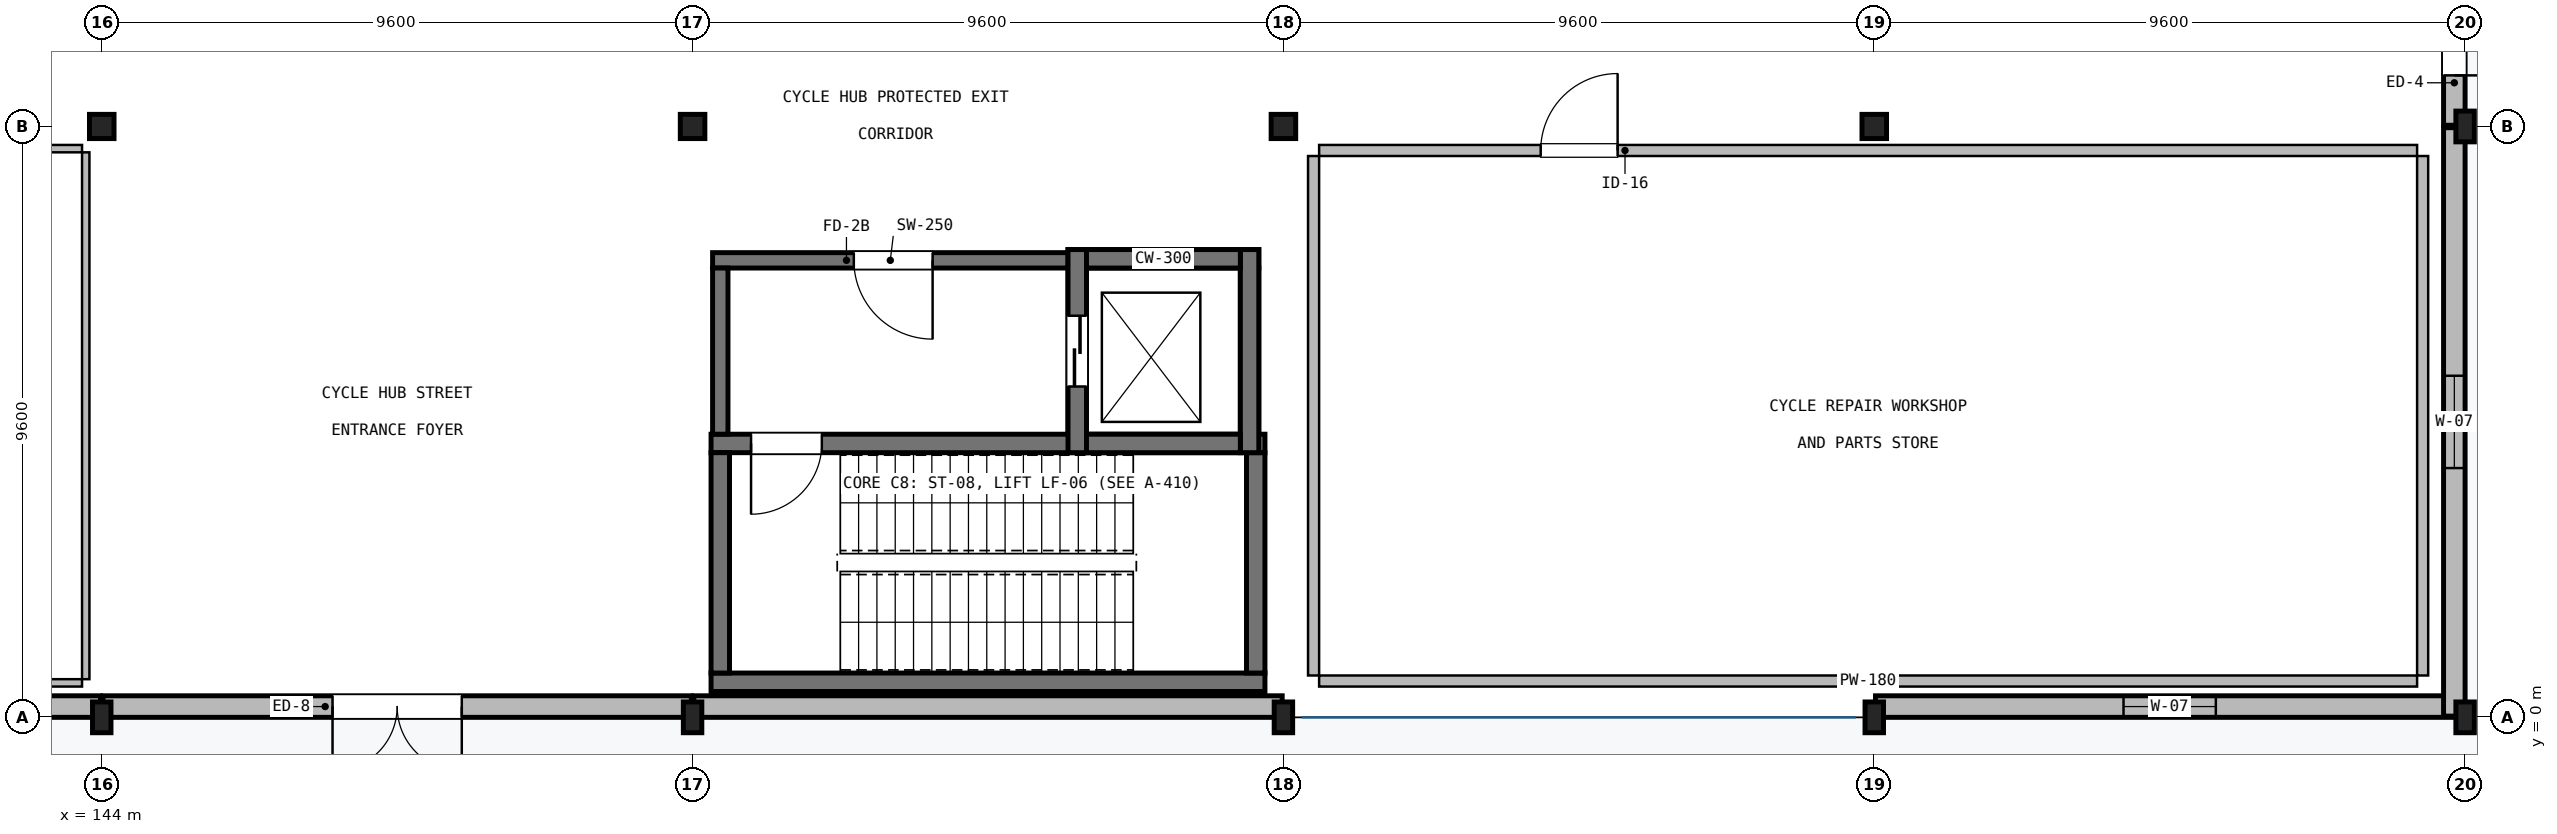
"""IFC4 building model, lengths in metres.
Left out: names, types, materials, properties, quantities, classifications, styles, units other than length and angle.
Written with IfcOpenShell. Run it as: python <this file> out.ifc"""

import sys

from ifc_helpers import new_model, si_unit, direction, frame, frame_2d, origin, origin_2d, place, context, subcontext, project, spatial, rectangle, i_section, extrude, element, fill, save


model = new_model("IFC4")
c1 = context("Model", 3, precision=1e-05, world=origin(), true_north=direction((0.0, 1.0)))
c2 = subcontext(c1, "Body", "Model", "MODEL_VIEW")
j1 = project(units=[si_unit("LENGTHUNIT", "METRE"), si_unit("PLANEANGLEUNIT", "RADIAN")], contexts=[c1])
p1 = place(None, origin())
s1 = spatial("IfcSite", under=j1, at=p1, CompositionType="ELEMENT")
p2 = place(p1, origin())
s2 = spatial("IfcBuilding", under=s1, at=p2, CompositionType="ELEMENT")
p3 = place(p2, origin())
s3 = spatial("IfcBuildingStorey", under=s2, at=p3, CompositionType="ELEMENT", Elevation=0.0)
p4 = place(p3, frame((144.0, 0.0, -0.36), z_axis=(0.0, 0.0, 1.0), x_axis=(1.0, 0.0, 0.0)))
e1 = element("IfcColumn", 1, at=p4, inside=s3, PredefinedType="COLUMN", context=c2, shape_type="SweptSolid", body=[
    extrude(i_section(OverallWidth=0.3, OverallDepth=0.5, WebThickness=0.014, FlangeThickness=0.028, FilletRadius=0.027, at=origin_2d()), origin(), (0.0, 0.0, 1.0), 6.11),
])
p5 = place(p3, frame((144.0, 9.6, -0.36), z_axis=(0.0, 0.0, 1.0), x_axis=(1.0, 0.0, 0.0)))
e2 = element("IfcColumn", 2, at=p5, inside=s3, PredefinedType="COLUMN", context=c2, shape_type="SweptSolid", body=[
    extrude(i_section(OverallWidth=0.399, OverallDepth=0.394, WebThickness=0.023, FlangeThickness=0.037, FilletRadius=0.015, at=origin_2d()), origin(), (0.0, 0.0, 1.0), 6.11),
])
p6 = place(p3, frame((153.6, 0.0, -0.36), z_axis=(0.0, 0.0, 1.0), x_axis=(1.0, 0.0, 0.0)))
e3 = element("IfcColumn", 3, at=p6, inside=s3, PredefinedType="COLUMN", context=c2, shape_type="SweptSolid", body=[
    extrude(i_section(OverallWidth=0.3, OverallDepth=0.5, WebThickness=0.014, FlangeThickness=0.028, FilletRadius=0.027, at=origin_2d()), origin(), (0.0, 0.0, 1.0), 6.11),
])
p7 = place(p3, frame((153.6, 9.6, -0.36), z_axis=(0.0, 0.0, 1.0), x_axis=(1.0, 0.0, 0.0)))
e4 = element("IfcColumn", 4, at=p7, inside=s3, PredefinedType="COLUMN", context=c2, shape_type="SweptSolid", body=[
    extrude(i_section(OverallWidth=0.399, OverallDepth=0.394, WebThickness=0.023, FlangeThickness=0.037, FilletRadius=0.015, at=origin_2d()), origin(), (0.0, 0.0, 1.0), 6.11),
])
p8 = place(p3, frame((163.2, 0.0, -0.36), z_axis=(0.0, 0.0, 1.0), x_axis=(1.0, 0.0, 0.0)))
e5 = element("IfcColumn", 5, at=p8, inside=s3, PredefinedType="COLUMN", context=c2, shape_type="SweptSolid", body=[
    extrude(i_section(OverallWidth=0.3, OverallDepth=0.5, WebThickness=0.014, FlangeThickness=0.028, FilletRadius=0.027, at=origin_2d()), origin(), (0.0, 0.0, 1.0), 6.11),
])
p9 = place(p3, frame((163.2, 9.6, -0.36), z_axis=(0.0, 0.0, 1.0), x_axis=(1.0, 0.0, 0.0)))
e6 = element("IfcColumn", 6, at=p9, inside=s3, PredefinedType="COLUMN", context=c2, shape_type="SweptSolid", body=[
    extrude(i_section(OverallWidth=0.399, OverallDepth=0.394, WebThickness=0.023, FlangeThickness=0.037, FilletRadius=0.015, at=origin_2d()), origin(), (0.0, 0.0, 1.0), 6.11),
])
p10 = place(p3, frame((172.8, 0.0, -0.36), z_axis=(0.0, 0.0, 1.0), x_axis=(1.0, 0.0, 0.0)))
e7 = element("IfcColumn", 7, at=p10, inside=s3, PredefinedType="COLUMN", context=c2, shape_type="SweptSolid", body=[
    extrude(i_section(OverallWidth=0.3, OverallDepth=0.5, WebThickness=0.014, FlangeThickness=0.028, FilletRadius=0.027, at=origin_2d()), origin(), (0.0, 0.0, 1.0), 6.11),
])
p11 = place(p3, frame((172.8, 9.6, -0.36), z_axis=(0.0, 0.0, 1.0), x_axis=(1.0, 0.0, 0.0)))
e8 = element("IfcColumn", 8, at=p11, inside=s3, PredefinedType="COLUMN", context=c2, shape_type="SweptSolid", body=[
    extrude(i_section(OverallWidth=0.399, OverallDepth=0.394, WebThickness=0.023, FlangeThickness=0.037, FilletRadius=0.015, at=origin_2d()), origin(), (0.0, 0.0, 1.0), 6.11),
])
for number, where, z_axis, x_axis in (
    (9, (182.4, 0.0, -0.36), (0.0, 0.0, 1.0), (1.0, 0.0, 0.0)),
    (10, (182.4, 9.6, -0.36), (0.0, 0.0, 1.0), (1.0, 0.0, 0.0)),
):
    element("IfcColumn", number, at=place(p3, frame(where, z_axis=z_axis, x_axis=x_axis)), inside=s3, PredefinedType="COLUMN", context=c2, shape_type="SweptSolid", body=[
        extrude(i_section(OverallWidth=0.3, OverallDepth=0.5, WebThickness=0.014, FlangeThickness=0.028, FilletRadius=0.027, at=origin_2d()), origin(), (0.0, 0.0, 1.0), 6.11),
    ])
p12 = place(p3, frame((153.9, 0.57, 0.0), z_axis=(0.0, 0.0, 1.0), x_axis=(1.0, 0.0, 0.0)))
e11 = element("IfcWall", 11, at=p12, inside=s3, PredefinedType="SHEAR", context=c2, shape_type="SweptSolid", body=[
    extrude(rectangle(XDim=9.0, YDim=0.3, at=frame_2d((4.5, 0.0))), origin(), (0.0, 0.0, 1.0), 5.75),
])
p13 = place(p3, frame((162.9, 4.45, 0.0), z_axis=(0.0, 0.0, 1.0), x_axis=(-1.0, 0.0, 0.0)))
e12 = element("IfcWall", 12, at=p13, inside=s3, PredefinedType="SHEAR", context=c2, shape_type="SweptSolid", body=[
    extrude(rectangle(XDim=9.0, YDim=0.3, at=frame_2d((4.5, 0.0))), origin(), (0.0, 0.0, 1.0), 5.75),
])
p14 = place(p13, frame((7.2, 0.0, 0.0)))
e13 = element("IfcOpeningElement", 13, at=p14, cuts=e12, PredefinedType="OPENING", context=c2, shape_type="SweptSolid", body=[
    extrude(rectangle(XDim=1.15, YDim=2.15, at=frame_2d((0.575, 1.075))), frame((0.0, 0.16, 0.0), z_axis=(0.0, -1.0, 0.0), x_axis=(1.0, 0.0, 0.0)), (0.0, 0.0, 1.0), 0.32),
])
for number, where, z_axis, x_axis in (
    (14, (154.05, 0.72, 0.0), (0.0, 0.0, 1.0), (0.0, 1.0, 0.0)),
    (15, (162.75, 4.3, 0.0), (0.0, 0.0, 1.0), (0.0, -1.0, 0.0)),
):
    element("IfcWall", number, at=place(p3, frame(where, z_axis=z_axis, x_axis=x_axis)), inside=s3, PredefinedType="SHEAR", context=c2, shape_type="SweptSolid", body=[
        extrude(rectangle(XDim=3.58, YDim=0.3, at=frame_2d((1.79, 0.0))), origin(), (0.0, 0.0, 1.0), 5.75),
    ])
p15 = place(p3, frame((159.85, 7.3, 0.0), z_axis=(0.0, 0.0, 1.0), x_axis=(0.0, -1.0, 0.0)))
e16 = element("IfcWall", 16, at=p15, inside=s3, PredefinedType="SHEAR", context=c2, shape_type="SweptSolid", body=[
    extrude(rectangle(XDim=2.7, YDim=0.3, at=frame_2d((1.35, 0.0))), origin(), (0.0, 0.0, 1.0), 5.75),
])
p16 = place(p15, frame((0.775, 0.0, 0.0)))
e17 = element("IfcOpeningElement", 17, at=p16, cuts=e16, PredefinedType="OPENING", context=c2, shape_type="SweptSolid", body=[
    extrude(rectangle(XDim=1.15, YDim=2.1, at=frame_2d((0.575, 1.05))), frame((0.0, 0.16, 0.0), z_axis=(0.0, -1.0, 0.0), x_axis=(1.0, 0.0, 0.0)), (0.0, 0.0, 1.0), 0.32),
])
p17 = place(p3, frame((162.65, 4.6, 0.0), z_axis=(0.0, 0.0, 1.0), x_axis=(0.0, 1.0, 0.0)))
e18 = element("IfcWall", 18, at=p17, inside=s3, PredefinedType="SHEAR", context=c2, shape_type="SweptSolid", body=[
    extrude(rectangle(XDim=2.7, YDim=0.3, at=frame_2d((1.35, 0.0))), origin(), (0.0, 0.0, 1.0), 5.75),
])
p18 = place(p3, frame((159.7, 7.45, 0.0), z_axis=(0.0, 0.0, 1.0), x_axis=(1.0, 0.0, 0.0)))
e19 = element("IfcWall", 19, at=p18, inside=s3, PredefinedType="SHEAR", context=c2, shape_type="SweptSolid", body=[
    extrude(rectangle(XDim=3.1, YDim=0.3, at=frame_2d((1.55, 0.0))), origin(), (0.0, 0.0, 1.0), 5.75),
])
p19 = place(p3, frame((159.7, 7.425, 0.0), z_axis=(0.0, 0.0, 1.0), x_axis=(-1.0, 0.0, 0.0)))
e20 = element("IfcWall", 20, at=p19, inside=s3, PredefinedType="SHEAR", context=c2, shape_type="SweptSolid", body=[
    extrude(rectangle(XDim=5.775, YDim=0.25, at=frame_2d((2.887, 0.0))), origin(), (0.0, 0.0, 1.0), 5.75),
])
p20 = place(p19, frame((2.2, 0.0, 0.0)))
e21 = element("IfcOpeningElement", 21, at=p20, cuts=e20, PredefinedType="OPENING", context=c2, shape_type="SweptSolid", body=[
    extrude(rectangle(XDim=1.28, YDim=2.2, at=frame_2d((0.64, 1.1))), frame((0.0, 0.135, 0.0), z_axis=(0.0, -1.0, 0.0), x_axis=(1.0, 0.0, 0.0)), (0.0, 0.0, 1.0), 0.27),
])
p21 = place(p3, frame((154.05, 4.6, 0.0), z_axis=(0.0, 0.0, 1.0), x_axis=(0.0, 1.0, 0.0)))
e22 = element("IfcWall", 22, at=p21, inside=s3, PredefinedType="SHEAR", context=c2, shape_type="SweptSolid", body=[
    extrude(rectangle(XDim=2.7, YDim=0.25, at=frame_2d((1.35, 0.0))), origin(), (0.0, 0.0, 1.0), 5.75),
])
for number, where, z_axis, x_axis in (
    (23, (159.85, 4.3, -1.2), (0.0, 0.0, 1.0), (0.0, 1.0, 0.0)),
    (24, (162.65, 4.3, -1.2), (0.0, 0.0, 1.0), (0.0, 1.0, 0.0)),
):
    element("IfcWall", number, at=place(p3, frame(where, z_axis=z_axis, x_axis=x_axis)), inside=s3, PredefinedType="SHEAR", context=c2, shape_type="SweptSolid", body=[
        extrude(rectangle(XDim=3.3, YDim=0.3, at=frame_2d((1.65, 0.0))), origin(), (0.0, 0.0, 1.0), 0.82),
    ])
for number, where, z_axis, x_axis in (
    (25, (160.0, 4.45, -1.2), (0.0, 0.0, 1.0), (1.0, 0.0, 0.0)),
    (26, (160.0, 7.45, -1.2), (0.0, 0.0, 1.0), (1.0, 0.0, 0.0)),
):
    element("IfcWall", number, at=place(p3, frame(where, z_axis=z_axis, x_axis=x_axis)), inside=s3, PredefinedType="SHEAR", context=c2, shape_type="SweptSolid", body=[
        extrude(rectangle(XDim=2.5, YDim=0.3, at=frame_2d((1.25, 0.0))), origin(), (0.0, 0.0, 1.0), 0.82),
    ])
p22 = place(p3, frame((143.98, 0.175, 0.0), z_axis=(0.0, 0.0, 1.0), x_axis=(-1.0, 0.0, 0.0)))
e27 = element("IfcWall", 27, at=p22, inside=s3, PredefinedType="SOLIDWALL", context=c2, shape_type="SweptSolid", body=[
    extrude(rectangle(XDim=9.56, YDim=0.35, at=frame_2d((4.78, 0.0))), origin(), (0.0, 0.0, 1.0), 5.4),
])
p23 = place(p22, frame((3.505, 0.0, 0.9)))
e28 = element("IfcOpeningElement", 28, at=p23, cuts=e27, PredefinedType="OPENING", context=c2, shape_type="SweptSolid", body=[
    extrude(rectangle(XDim=2.55, YDim=1.8, at=frame_2d((1.275, 0.9))), frame((0.0, 0.185, 0.0), z_axis=(0.0, -1.0, 0.0), x_axis=(1.0, 0.0, 0.0)), (0.0, 0.0, 1.0), 0.37),
])
p24 = place(p3, frame((153.58, 0.175, 0.0), z_axis=(0.0, 0.0, 1.0), x_axis=(-1.0, 0.0, 0.0)))
e29 = element("IfcWall", 29, at=p24, inside=s3, PredefinedType="SOLIDWALL", context=c2, shape_type="SweptSolid", body=[
    extrude(rectangle(XDim=9.56, YDim=0.35, at=frame_2d((4.78, 0.0))), origin(), (0.0, 0.0, 1.0), 5.4),
])
p25 = place(p24, frame((3.73, 0.0, 0.0)))
e30 = element("IfcOpeningElement", 30, at=p25, cuts=e29, PredefinedType="OPENING", context=c2, shape_type="SweptSolid", body=[
    extrude(rectangle(XDim=2.1, YDim=2.35, at=frame_2d((1.05, 1.175))), frame((0.0, 0.185, 0.0), z_axis=(0.0, -1.0, 0.0), x_axis=(1.0, 0.0, 0.0)), (0.0, 0.0, 1.0), 0.37),
])
p26 = place(p3, frame((163.18, 0.175, 0.0), z_axis=(0.0, 0.0, 1.0), x_axis=(-1.0, 0.0, 0.0)))
e31 = element("IfcWall", 31, at=p26, inside=s3, PredefinedType="SOLIDWALL", context=c2, shape_type="SweptSolid", body=[
    extrude(rectangle(XDim=9.56, YDim=0.35, at=frame_2d((4.78, 0.0))), origin(), (0.0, 0.0, 1.0), 5.4),
])
p27 = place(p3, frame((182.38, 0.175, 0.0), z_axis=(0.0, 0.0, 1.0), x_axis=(-1.0, 0.0, 0.0)))
e32 = element("IfcWall", 32, at=p27, inside=s3, PredefinedType="SOLIDWALL", context=c2, shape_type="SweptSolid", body=[
    extrude(rectangle(XDim=9.56, YDim=0.35, at=frame_2d((4.78, 0.0))), origin(), (0.0, 0.0, 1.0), 5.4),
])
p28 = place(p27, frame((4.03, 0.0, 0.9)))
e33 = element("IfcOpeningElement", 33, at=p28, cuts=e32, PredefinedType="OPENING", context=c2, shape_type="SweptSolid", body=[
    extrude(rectangle(XDim=1.5, YDim=1.5, at=frame_2d((0.75, 0.75))), frame((0.0, 0.185, 0.0), z_axis=(0.0, -1.0, 0.0), x_axis=(1.0, 0.0, 0.0)), (0.0, 0.0, 1.0), 0.37),
])
p29 = place(p3, frame((182.225, 9.58, 0.0), z_axis=(0.0, 0.0, 1.0), x_axis=(0.0, -1.0, 0.0)))
e34 = element("IfcWall", 34, at=p29, inside=s3, PredefinedType="SOLIDWALL", context=c2, shape_type="SweptSolid", body=[
    extrude(rectangle(XDim=9.56, YDim=0.35, at=frame_2d((4.78, 0.0))), origin(), (0.0, 0.0, 1.0), 5.217),
])
p30 = place(p29, frame((4.03, 0.0, 0.9)))
e35 = element("IfcOpeningElement", 35, at=p30, cuts=e34, PredefinedType="OPENING", context=c2, shape_type="SweptSolid", body=[
    extrude(rectangle(XDim=1.5, YDim=1.5, at=frame_2d((0.75, 0.75))), frame((0.0, 0.185, 0.0), z_axis=(0.0, -1.0, 0.0), x_axis=(1.0, 0.0, 0.0)), (0.0, 0.0, 1.0), 0.37),
])
p31 = place(p3, frame((182.225, 19.18, 0.0), z_axis=(0.0, 0.0, 1.0), x_axis=(0.0, -1.0, 0.0)))
e36 = element("IfcWall", 36, at=p31, inside=s3, PredefinedType="SOLIDWALL", context=c2, shape_type="SweptSolid", body=[
    extrude(rectangle(XDim=9.56, YDim=0.35, at=frame_2d((4.78, 0.0))), origin(), (0.0, 0.0, 1.0), 5.217),
])
p32 = place(p31, frame((7.15, 0.0, 0.0)))
e37 = element("IfcOpeningElement", 37, at=p32, cuts=e36, PredefinedType="OPENING", context=c2, shape_type="SweptSolid", body=[
    extrude(rectangle(XDim=1.6, YDim=2.2, at=frame_2d((0.8, 1.1))), frame((0.0, 0.185, 0.0), z_axis=(0.0, -1.0, 0.0), x_axis=(1.0, 0.0, 0.0)), (0.0, 0.0, 1.0), 0.37),
])
p33 = place(p3, frame((181.62, 0.59, 0.0), z_axis=(0.0, 0.0, 1.0), x_axis=(-1.0, 0.0, 0.0)))
e38 = element("IfcWall", 38, at=p33, inside=s3, PredefinedType="PARTITIONING", context=c2, shape_type="SweptSolid", body=[
    extrude(rectangle(XDim=17.84, YDim=0.18, at=frame_2d((8.92, 0.0))), origin(), (0.0, 0.0, 1.0), 5.207),
])
p34 = place(p3, frame((163.78, 9.21, 0.0), z_axis=(0.0, 0.0, 1.0), x_axis=(1.0, 0.0, 0.0)))
e39 = element("IfcWall", 39, at=p34, inside=s3, PredefinedType="PARTITIONING", context=c2, shape_type="SweptSolid", body=[
    extrude(rectangle(XDim=17.84, YDim=0.18, at=frame_2d((8.92, 0.0))), origin(), (0.0, 0.0, 1.0), 5.207),
])
p35 = place(p34, frame((3.6, 0.0, 0.0)))
e40 = element("IfcOpeningElement", 40, at=p35, cuts=e39, PredefinedType="OPENING", context=c2, shape_type="SweptSolid", body=[
    extrude(rectangle(XDim=1.25, YDim=2.25, at=frame_2d((0.625, 1.125))), frame((0.0, 0.1, 0.0), z_axis=(0.0, -1.0, 0.0), x_axis=(1.0, 0.0, 0.0)), (0.0, 0.0, 1.0), 0.2),
])
for number, where, z_axis, x_axis in (
    (41, (163.69, 0.68, 0.0), (0.0, 0.0, 1.0), (0.0, 1.0, 0.0)),
    (42, (181.71, 9.12, 0.0), (0.0, 0.0, 1.0), (0.0, -1.0, 0.0)),
):
    element("IfcWall", number, at=place(p3, frame(where, z_axis=z_axis, x_axis=x_axis)), inside=s3, PredefinedType="PARTITIONING", context=c2, shape_type="SweptSolid", body=[
        extrude(rectangle(XDim=8.44, YDim=0.18, at=frame_2d((4.22, 0.0))), origin(), (0.0, 0.0, 1.0), 5.39),
    ])
p36 = place(p3, frame((143.68, 0.56, 0.0), z_axis=(0.0, 0.0, 1.0), x_axis=(-1.0, 0.0, 0.0)))
e43 = element("IfcWall", 43, at=p36, inside=s3, PredefinedType="PARTITIONING", context=c2, shape_type="SweptSolid", body=[
    extrude(rectangle(XDim=8.76, YDim=0.12, at=frame_2d((4.38, 0.0))), origin(), (0.0, 0.0, 1.0), 5.39),
])
p37 = place(p3, frame((134.92, 9.24, 0.0), z_axis=(0.0, 0.0, 1.0), x_axis=(1.0, 0.0, 0.0)))
e44 = element("IfcWall", 44, at=p37, inside=s3, PredefinedType="PARTITIONING", context=c2, shape_type="SweptSolid", body=[
    extrude(rectangle(XDim=8.76, YDim=0.12, at=frame_2d((4.38, 0.0))), origin(), (0.0, 0.0, 1.0), 5.39),
])
p38 = place(p37, frame((3.63, 0.0, 0.0)))
e45 = element("IfcOpeningElement", 45, at=p38, cuts=e44, PredefinedType="OPENING", context=c2, shape_type="SweptSolid", body=[
    extrude(rectangle(XDim=1.5, YDim=2.25, at=frame_2d((0.75, 1.125))), frame((0.0, 0.07, 0.0), z_axis=(0.0, -1.0, 0.0), x_axis=(1.0, 0.0, 0.0)), (0.0, 0.0, 1.0), 0.14),
])
p39 = place(p3, frame((143.74, 9.18, 0.0), z_axis=(0.0, 0.0, 1.0), x_axis=(0.0, -1.0, 0.0)))
e46 = element("IfcWall", 46, at=p39, inside=s3, PredefinedType="PARTITIONING", context=c2, shape_type="SweptSolid", body=[
    extrude(rectangle(XDim=8.56, YDim=0.12, at=frame_2d((4.28, 0.0))), origin(), (0.0, 0.0, 1.0), 5.39),
])
p40 = place(p14, origin())
e47 = element("IfcDoor", 47, at=p40, inside=s3, OperationType="SINGLE_SWING_RIGHT", PredefinedType="DOOR", context=c2, shape_type="SweptSolid", body=[
    extrude(rectangle(XDim=1.15, YDim=2.15, at=frame_2d((0.575, 1.075))), frame((0.0, 0.025, 0.0), z_axis=(0.0, -1.0, 0.0), x_axis=(1.0, 0.0, 0.0)), (0.0, 0.0, 1.0), 0.05),
])
fill(e13, e47)
p41 = place(p16, frame((1.15, 0.0, 0.0), z_axis=(0.0, 0.0, 1.0), x_axis=(-1.0, 0.0, 0.0)))
e48 = element("IfcDoor", 48, at=p41, inside=s3, OperationType="DOUBLE_DOOR_SLIDING", PredefinedType="DOOR", context=c2, shape_type="SweptSolid", body=[
    extrude(rectangle(XDim=1.15, YDim=2.1, at=frame_2d((0.575, 1.05))), frame((0.0, 0.025, 0.0), z_axis=(0.0, -1.0, 0.0), x_axis=(1.0, 0.0, 0.0)), (0.0, 0.0, 1.0), 0.05),
])
fill(e17, e48)
p42 = place(p20, origin())
e49 = element("IfcDoor", 49, at=p42, inside=s3, OperationType="SINGLE_SWING_LEFT", PredefinedType="DOOR", context=c2, shape_type="SweptSolid", body=[
    extrude(rectangle(XDim=1.28, YDim=2.2, at=frame_2d((0.64, 1.1))), frame((0.0, 0.025, 0.0), z_axis=(0.0, -1.0, 0.0), x_axis=(1.0, 0.0, 0.0)), (0.0, 0.0, 1.0), 0.05),
])
fill(e21, e49)
p43 = place(p25, origin())
e50 = element("IfcDoor", 50, at=p43, inside=s3, OperationType="DOUBLE_DOOR_SINGLE_SWING", PredefinedType="DOOR", context=c2, shape_type="SweptSolid", body=[
    extrude(rectangle(XDim=2.1, YDim=2.35, at=frame_2d((1.05, 1.175))), frame((0.0, 0.025, 0.0), z_axis=(0.0, -1.0, 0.0), x_axis=(1.0, 0.0, 0.0)), (0.0, 0.0, 1.0), 0.05),
])
fill(e30, e50)
p44 = place(p28, origin())
e51 = element("IfcWindow", 51, at=p44, inside=s3, PartitioningType="SINGLE_PANEL", PredefinedType="WINDOW", context=c2, shape_type="SweptSolid", body=[
    extrude(rectangle(XDim=1.5, YDim=1.5, at=frame_2d((0.75, 0.75))), frame((0.0, 0.03, 0.0), z_axis=(0.0, -1.0, 0.0), x_axis=(1.0, 0.0, 0.0)), (0.0, 0.0, 1.0), 0.06),
])
fill(e33, e51)
p45 = place(p30, origin())
e52 = element("IfcWindow", 52, at=p45, inside=s3, PartitioningType="SINGLE_PANEL", PredefinedType="WINDOW", context=c2, shape_type="SweptSolid", body=[
    extrude(rectangle(XDim=1.5, YDim=1.5, at=frame_2d((0.75, 0.75))), frame((0.0, 0.03, 0.0), z_axis=(0.0, -1.0, 0.0), x_axis=(1.0, 0.0, 0.0)), (0.0, 0.0, 1.0), 0.06),
])
fill(e35, e52)
p46 = place(p32, origin())
e53 = element("IfcDoor", 53, at=p46, inside=s3, OperationType="DOUBLE_DOOR_SINGLE_SWING", PredefinedType="DOOR", context=c2, shape_type="SweptSolid", body=[
    extrude(rectangle(XDim=1.6, YDim=2.2, at=frame_2d((0.8, 1.1))), frame((0.0, 0.025, 0.0), z_axis=(0.0, -1.0, 0.0), x_axis=(1.0, 0.0, 0.0)), (0.0, 0.0, 1.0), 0.05),
])
fill(e37, e53)
p47 = place(p35, origin())
e54 = element("IfcDoor", 54, at=p47, inside=s3, OperationType="SINGLE_SWING_RIGHT", PredefinedType="DOOR", context=c2, shape_type="SweptSolid", body=[
    extrude(rectangle(XDim=1.25, YDim=2.25, at=frame_2d((0.625, 1.125))), frame((0.0, 0.025, 0.0), z_axis=(0.0, -1.0, 0.0), x_axis=(1.0, 0.0, 0.0)), (0.0, 0.0, 1.0), 0.05),
])
fill(e40, e54)
save(model, sys.argv[1])
